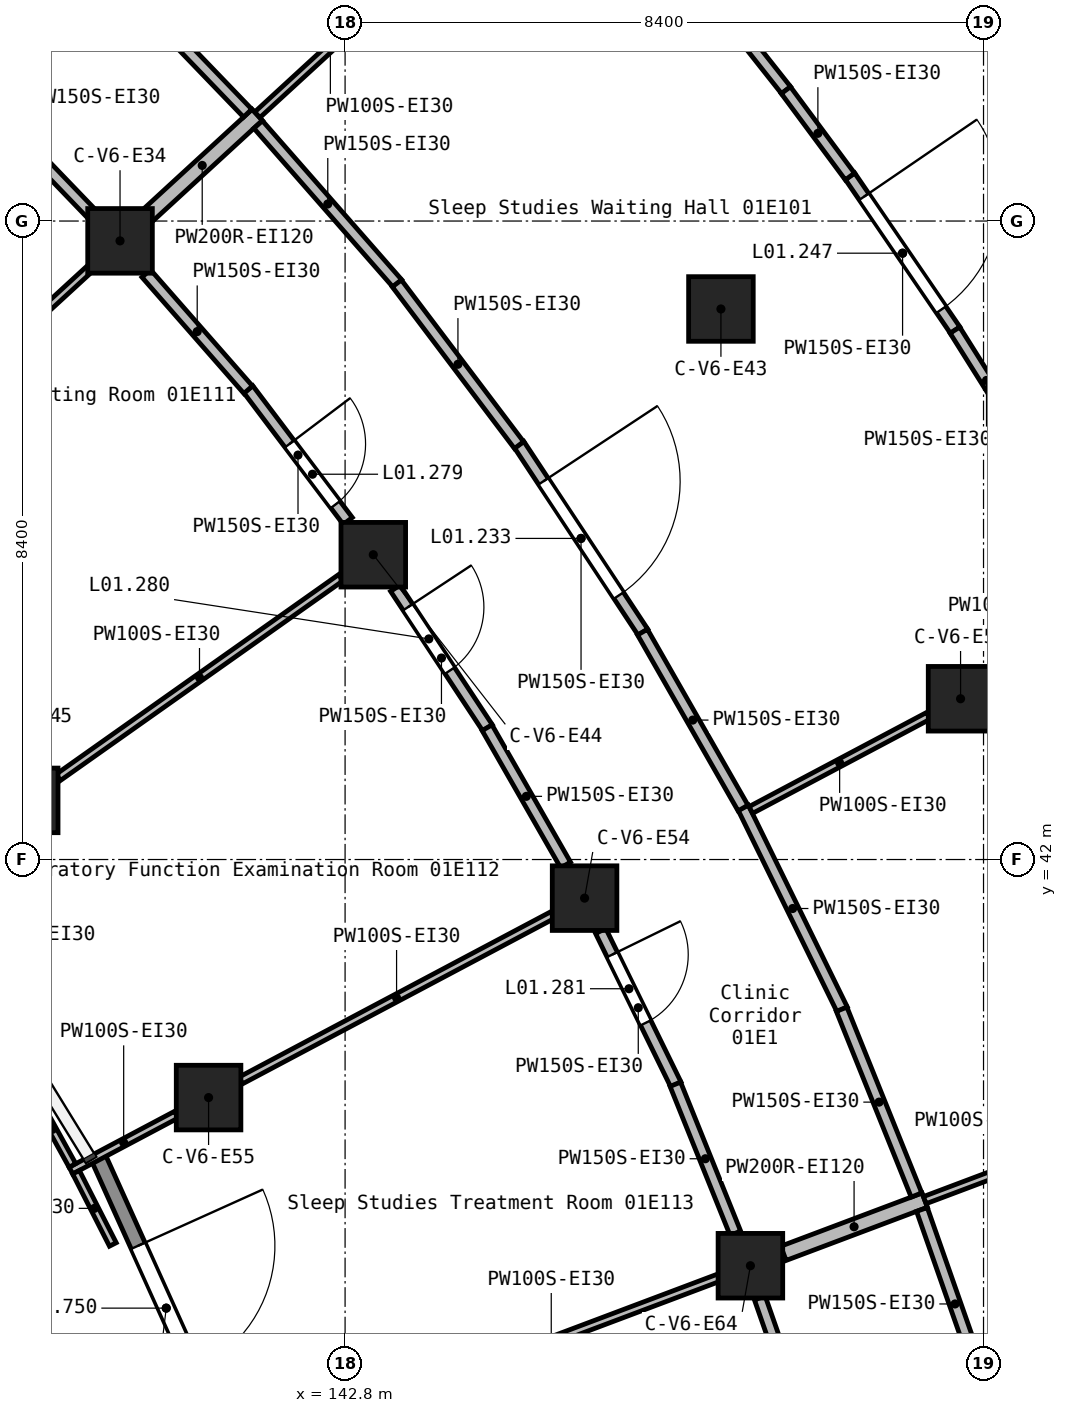
"""IFC4 building model, lengths in metres.
Left out: names, types, materials, properties, quantities, classifications, styles, units other than length and angle.
Written with IfcOpenShell. Run it as: python <this file> out.ifc"""

import sys

from ifc_helpers import new_model, si_unit, direction, frame, frame_2d, origin, origin_2d, place, context, subcontext, project, spatial, rectangle, extrude, element, fill, save


model = new_model("IFC4")
c1 = context("Model", 3, precision=1e-05, world=origin(), true_north=direction((0.0, 1.0)))
c2 = subcontext(c1, "Body", "Model", "MODEL_VIEW")
j1 = project(units=[si_unit("LENGTHUNIT", "METRE"), si_unit("PLANEANGLEUNIT", "RADIAN")], contexts=[c1])
p1 = place(None, origin())
s1 = spatial("IfcSite", under=j1, at=p1, CompositionType="ELEMENT")
p2 = place(p1, origin())
s2 = spatial("IfcBuilding", under=s1, at=p2, CompositionType="ELEMENT")
p3 = place(p2, frame((0.0, 0.0, 5.4)))
s3 = spatial("IfcBuildingStorey", under=s2, at=p3, CompositionType="ELEMENT", Elevation=5.4)
for number, where, z_axis, x_axis in (
    (1, (138.598, 42.778, 0.0), (0.0, 0.0, 1.0), (1.0, 0.0, 0.0)),
    (2, (139.839, 50.139, 0.0), (0.0, 0.0, 1.0), (1.0, 0.0, 0.0)),
    (3, (141.004, 38.868, 0.0), (0.0, 0.0, 1.0), (1.0, 0.0, 0.0)),
    (4, (143.171, 46.01, 0.0), (0.0, 0.0, 1.0), (1.0, 0.0, 0.0)),
    (5, (145.951, 41.492, 0.0), (0.0, 0.0, 1.0), (1.0, 0.0, 0.0)),
    (6, (147.745, 49.243, 0.0), (0.0, 0.0, 1.0), (1.0, 0.0, 0.0)),
    (7, (148.133, 36.656, 0.0), (0.0, 0.0, 1.0), (1.0, 0.0, 0.0)),
    (8, (150.898, 44.115, 0.0), (0.0, 0.0, 1.0), (1.0, 0.0, 0.0)),
):
    element("IfcColumn", number, at=place(p3, frame(where, z_axis=z_axis, x_axis=x_axis)), inside=s3, PredefinedType="COLUMN", context=c2, shape_type="SweptSolid", body=[
        extrude(rectangle(XDim=0.85, YDim=0.85, at=origin_2d()), origin(), (0.0, 0.0, 1.0), 4.5),
    ])
p4 = place(p3, frame((139.549, 38.089, 0.0), z_axis=(0.0, 0.0, 1.0), x_axis=(0.411110484999, -0.911585524854, 0.0)))
e9 = element("IfcWall", 9, at=p4, inside=s3, PredefinedType="STANDARD", context=c2, shape_type="SweptSolid", body=[
    extrude(rectangle(XDim=4.368, YDim=0.2, at=frame_2d((2.184, 0.0))), origin(), (0.0, 0.0, 1.0), 3.35),
])
p5 = place(p4, frame((1.284, 0.0, 0.0)))
e10 = element("IfcOpeningElement", 10, at=p5, cuts=e9, PredefinedType="OPENING", context=c2, shape_type="SweptSolid", body=[
    extrude(rectangle(XDim=1.8, YDim=2.4, at=frame_2d((0.9, 1.2))), frame((0.0, 0.11, 0.0), z_axis=(0.0, -1.0, 0.0), x_axis=(1.0, 0.0, 0.0)), (0.0, 0.0, 1.0), 0.22),
])
p6 = place(p3, frame((140.196, 50.467, 0.0), z_axis=(0.0, 0.0, 1.0), x_axis=(0.736519787736, 0.676415997943, 0.0)))
e11 = element("IfcWall", 11, at=p6, inside=s3, PredefinedType="SOLIDWALL", context=c2, shape_type="SweptSolid", body=[
    extrude(rectangle(XDim=1.966, YDim=0.2, at=frame_2d((0.983, 0.0))), origin(), (0.0, 0.0, 1.0), 4.15),
])
p7 = place(p3, frame((148.567, 36.819, 0.0), z_axis=(0.0, 0.0, 1.0), x_axis=(0.935934561344, 0.352173958268, 0.0)))
e12 = element("IfcWall", 12, at=p7, inside=s3, PredefinedType="SOLIDWALL", context=c2, shape_type="SweptSolid", body=[
    extrude(rectangle(XDim=1.986, YDim=0.2, at=frame_2d((0.993, 0.0))), origin(), (0.0, 0.0, 1.0), 4.15),
])
p8 = place(p3, frame((148.038, 42.683, 0.0), z_axis=(0.0, 0.0, 1.0), x_axis=(0.440200278942, -0.897899612663, 0.0)))
e13 = element("IfcWall", 13, at=p8, inside=s3, PredefinedType="PARTITIONING", context=c2, shape_type="SweptSolid", body=[
    extrude(rectangle(XDim=2.958, YDim=0.15, at=frame_2d((1.479, 0.0))), origin(), (0.0, 0.0, 1.0), 4.15),
])
p9 = place(p3, frame((145.09, 47.458, 0.0), z_axis=(0.0, 0.0, 1.0), x_axis=(0.551018151494, -0.834493257447, 0.0)))
e14 = element("IfcWall", 14, at=p9, inside=s3, PredefinedType="PARTITIONING", context=c2, shape_type="SweptSolid", body=[
    extrude(rectangle(XDim=2.958, YDim=0.15, at=frame_2d((1.479, 0.0))), origin(), (0.0, 0.0, 1.0), 4.15),
])
p10 = place(p9, frame((0.579, 0.0, 0.0)))
e15 = element("IfcOpeningElement", 15, at=p10, cuts=e14, PredefinedType="OPENING", context=c2, shape_type="SweptSolid", body=[
    extrude(rectangle(XDim=1.8, YDim=2.1, at=frame_2d((0.9, 1.05))), frame((0.0, 0.085, 0.0), z_axis=(0.0, -1.0, 0.0), x_axis=(1.0, 0.0, 0.0)), (0.0, 0.0, 1.0), 0.17),
])
p11 = place(p3, frame((146.713, 44.992, 0.0), z_axis=(0.0, 0.0, 1.0), x_axis=(0.49622768999, -0.868192420888, 0.0)))
e16 = element("IfcWall", 16, at=p11, inside=s3, PredefinedType="PARTITIONING", context=c2, shape_type="SweptSolid", body=[
    extrude(rectangle(XDim=2.666, YDim=0.15, at=frame_2d((1.333, 0.0))), origin(), (0.0, 0.0, 1.0), 4.15),
])
p12 = place(p3, frame((141.656, 51.669, 0.0), z_axis=(0.0, 0.0, 1.0), x_axis=(0.659076402407, -0.752075990702, 0.0)))
e17 = element("IfcWall", 17, at=p12, inside=s3, PredefinedType="PARTITIONING", context=c2, shape_type="SweptSolid", body=[
    extrude(rectangle(XDim=2.78, YDim=0.15, at=frame_2d((1.39, 0.0))), origin(), (0.0, 0.0, 1.0), 4.15),
])
p13 = place(p3, frame((149.333, 40.03, 0.0), z_axis=(0.0, 0.0, 1.0), x_axis=(0.373865497673, -0.927482932269, 0.0)))
e18 = element("IfcWall", 18, at=p13, inside=s3, PredefinedType="PARTITIONING", context=c2, shape_type="SweptSolid", body=[
    extrude(rectangle(XDim=2.635, YDim=0.15, at=frame_2d((1.317, 0.0))), origin(), (0.0, 0.0, 1.0), 4.15),
])
p14 = place(p3, frame((143.481, 49.579, 0.0), z_axis=(0.0, 0.0, 1.0), x_axis=(0.602824021104, -0.797874175281, 0.0)))
e19 = element("IfcWall", 19, at=p14, inside=s3, PredefinedType="PARTITIONING", context=c2, shape_type="SweptSolid", body=[
    extrude(rectangle(XDim=2.666, YDim=0.15, at=frame_2d((1.333, 0.0))), origin(), (0.0, 0.0, 1.0), 4.15),
])
p15 = place(p3, frame((139.691, 53.718, 0.0), z_axis=(0.0, 0.0, 1.0), x_axis=(0.693447550136, -0.720507109757, 0.0)))
e20 = element("IfcWall", 20, at=p15, inside=s3, PredefinedType="PARTITIONING", context=c2, shape_type="SweptSolid", body=[
    extrude(rectangle(XDim=2.635, YDim=0.15, at=frame_2d((1.317, 0.0))), origin(), (0.0, 0.0, 1.0), 4.15),
])
p16 = place(p3, frame((150.39, 37.396, 0.0), z_axis=(0.0, 0.0, 1.0), x_axis=(0.330759074405, -0.943715229663, 0.0)))
e21 = element("IfcWall", 21, at=p16, inside=s3, PredefinedType="PARTITIONING", context=c2, shape_type="SweptSolid", body=[
    extrude(rectangle(XDim=2.634, YDim=0.15, at=frame_2d((1.317, 0.0))), origin(), (0.0, 0.0, 1.0), 4.15),
])
p17 = place(p3, frame((146.163, 41.06, 0.0), z_axis=(0.0, 0.0, 1.0), x_axis=(0.439946079235, -0.898024190858, 0.0)))
e22 = element("IfcWall", 22, at=p17, inside=s3, PredefinedType="PARTITIONING", context=c2, shape_type="SweptSolid", body=[
    extrude(rectangle(XDim=2.249, YDim=0.15, at=frame_2d((1.124, 0.0))), origin(), (0.0, 0.0, 1.0), 4.15),
])
p18 = place(p17, frame((0.346, 0.0, 0.0)))
e23 = element("IfcOpeningElement", 23, at=p18, cuts=e22, PredefinedType="OPENING", context=c2, shape_type="SweptSolid", body=[
    extrude(rectangle(XDim=1.0, YDim=2.1, at=frame_2d((0.5, 1.05))), frame((0.0, 0.085, 0.0), z_axis=(0.0, -1.0, 0.0), x_axis=(1.0, 0.0, 0.0)), (0.0, 0.0, 1.0), 0.17),
])
p19 = place(p3, frame((141.526, 48.188, 0.0), z_axis=(0.0, 0.0, 1.0), x_axis=(0.60280129331, -0.797891346477, 0.0)))
e24 = element("IfcWall", 24, at=p19, inside=s3, PredefinedType="PARTITIONING", context=c2, shape_type="SweptSolid", body=[
    extrude(rectangle(XDim=2.172, YDim=0.15, at=frame_2d((1.086, 0.0))), origin(), (0.0, 0.0, 1.0), 4.15),
])
p20 = place(p19, frame((0.902, 0.0, 0.0)))
e25 = element("IfcOpeningElement", 25, at=p20, cuts=e24, PredefinedType="OPENING", context=c2, shape_type="SweptSolid", body=[
    extrude(rectangle(XDim=1.0, YDim=2.1, at=frame_2d((0.5, 1.05))), frame((0.0, 0.085, 0.0), z_axis=(0.0, -1.0, 0.0), x_axis=(1.0, 0.0, 0.0)), (0.0, 0.0, 1.0), 0.17),
])
p21 = place(p3, frame((143.462, 45.57, 0.0), z_axis=(0.0, 0.0, 1.0), x_axis=(0.550880835548, -0.834583911315, 0.0)))
e26 = element("IfcWall", 26, at=p21, inside=s3, PredefinedType="PARTITIONING", context=c2, shape_type="SweptSolid", body=[
    extrude(rectangle(XDim=2.201, YDim=0.15, at=frame_2d((1.101, 0.0))), origin(), (0.0, 0.0, 1.0), 4.15),
])
p22 = place(p21, frame((0.299, 0.0, 0.0)))
e27 = element("IfcOpeningElement", 27, at=p22, cuts=e26, PredefinedType="OPENING", context=c2, shape_type="SweptSolid", body=[
    extrude(rectangle(XDim=1.0, YDim=2.1, at=frame_2d((0.5, 1.05))), frame((0.0, 0.085, 0.0), z_axis=(0.0, -1.0, 0.0), x_axis=(1.0, 0.0, 0.0)), (0.0, 0.0, 1.0), 0.17),
])
p23 = place(p3, frame((144.668, 43.734, 0.0), z_axis=(0.0, 0.0, 1.0), x_axis=(0.496694973164, -0.867925171679, 0.0)))
e28 = element("IfcWall", 28, at=p23, inside=s3, PredefinedType="PARTITIONING", context=c2, shape_type="SweptSolid", body=[
    extrude(rectangle(XDim=2.08, YDim=0.15, at=frame_2d((1.04, 0.0))), origin(), (0.0, 0.0, 1.0), 4.15),
])
p24 = place(p3, frame((147.145, 39.043, 0.0), z_axis=(0.0, 0.0, 1.0), x_axis=(0.373899406404, -0.927469263043, 0.0)))
e29 = element("IfcWall", 29, at=p24, inside=s3, PredefinedType="PARTITIONING", context=c2, shape_type="SweptSolid", body=[
    extrude(rectangle(XDim=2.113, YDim=0.15, at=frame_2d((1.057, 0.0))), origin(), (0.0, 0.0, 1.0), 4.15),
])
p25 = place(p3, frame((148.257, 36.232, 0.0), z_axis=(0.0, 0.0, 1.0), x_axis=(0.330477279651, -0.943813947574, 0.0)))
e30 = element("IfcWall", 30, at=p25, inside=s3, PredefinedType="PARTITIONING", context=c2, shape_type="SweptSolid", body=[
    extrude(rectangle(XDim=2.143, YDim=0.15, at=frame_2d((1.072, 0.0))), origin(), (0.0, 0.0, 1.0), 4.15),
])
p26 = place(p3, frame((140.184, 49.71, 0.0), z_axis=(0.0, 0.0, 1.0), x_axis=(0.659209376091, -0.751959439381, 0.0)))
e31 = element("IfcWall", 31, at=p26, inside=s3, PredefinedType="PARTITIONING", context=c2, shape_type="SweptSolid", body=[
    extrude(rectangle(XDim=2.035, YDim=0.15, at=frame_2d((1.017, 0.0))), origin(), (0.0, 0.0, 1.0), 4.15),
])
p27 = place(p3, frame((138.031, 51.985, 0.0), z_axis=(0.0, 0.0, 1.0), x_axis=(0.693216793474, -0.7207291289, 0.0)))
e32 = element("IfcWall", 32, at=p27, inside=s3, PredefinedType="PARTITIONING", context=c2, shape_type="SweptSolid", body=[
    extrude(rectangle(XDim=2.076, YDim=0.15, at=frame_2d((1.038, 0.0))), origin(), (0.0, 0.0, 1.0), 4.15),
])
p28 = place(p3, frame((149.443, 50.99, 0.0), z_axis=(0.0, 0.0, 1.0), x_axis=(0.564305795339, -0.825565847977, 0.0)))
e33 = element("IfcWall", 33, at=p28, inside=s3, PredefinedType="PARTITIONING", context=c2, shape_type="SweptSolid", body=[
    extrude(rectangle(XDim=2.454, YDim=0.15, at=frame_2d((1.227, 0.0))), origin(), (0.0, 0.0, 1.0), 4.15),
])
p29 = place(p28, frame((0.327, 0.0, 0.0)))
e34 = element("IfcOpeningElement", 34, at=p29, cuts=e33, PredefinedType="OPENING", context=c2, shape_type="SweptSolid", body=[
    extrude(rectangle(XDim=1.8, YDim=2.1, at=frame_2d((0.9, 1.05))), frame((0.0, 0.085, 0.0), z_axis=(0.0, -1.0, 0.0), x_axis=(1.0, 0.0, 0.0)), (0.0, 0.0, 1.0), 0.17),
])
p30 = place(p3, frame((150.823, 48.965, 0.0), z_axis=(0.0, 0.0, 1.0), x_axis=(0.531963557529, -0.846767248694, 0.0)))
e35 = element("IfcWall", 35, at=p30, inside=s3, PredefinedType="PARTITIONING", context=c2, shape_type="SweptSolid", body=[
    extrude(rectangle(XDim=1.563, YDim=0.15, at=frame_2d((0.781, 0.0))), origin(), (0.0, 0.0, 1.0), 4.15),
])
p31 = place(p3, frame((147.542, 53.462, 0.0), z_axis=(0.0, 0.0, 1.0), x_axis=(0.620542012859, -0.784173201708, 0.0)))
e36 = element("IfcWall", 36, at=p31, inside=s3, PredefinedType="PARTITIONING", context=c2, shape_type="SweptSolid", body=[
    extrude(rectangle(XDim=1.71, YDim=0.15, at=frame_2d((0.855, 0.0))), origin(), (0.0, 0.0, 1.0), 4.15),
])
p32 = place(p3, frame((148.599, 52.122, 0.0), z_axis=(0.0, 0.0, 1.0), x_axis=(0.595875663086, -0.803076705017, 0.0)))
e37 = element("IfcWall", 37, at=p32, inside=s3, PredefinedType="PARTITIONING", context=c2, shape_type="SweptSolid", body=[
    extrude(rectangle(XDim=1.414, YDim=0.15, at=frame_2d((0.707, 0.0))), origin(), (0.0, 0.0, 1.0), 4.15),
])
p33 = place(p3, frame((139.193, 37.908, 0.0), z_axis=(0.0, 0.0, 1.0), x_axis=(0.883481589726, 0.468465879884, 0.0)))
e38 = element("IfcWall", 38, at=p33, inside=s3, PredefinedType="PARTITIONING", context=c2, shape_type="SweptSolid", body=[
    extrude(rectangle(XDim=1.571, YDim=0.1, at=frame_2d((0.786, 0.0))), origin(), (0.0, 0.0, 1.0), 4.15),
])
p34 = place(p3, frame((141.427, 39.093, 0.0), z_axis=(0.0, 0.0, 1.0), x_axis=(0.88344099274, 0.46854243388, 0.0)))
e39 = element("IfcWall", 39, at=p34, inside=s3, PredefinedType="PARTITIONING", context=c2, shape_type="SweptSolid", body=[
    extrude(rectangle(XDim=4.642, YDim=0.1, at=frame_2d((2.321, 0.0))), origin(), (0.0, 0.0, 1.0), 4.15),
])
p35 = place(p3, frame((139.026, 43.081, 0.0), z_axis=(0.0, 0.0, 1.0), x_axis=(0.816637661001, 0.577150700108, 0.0)))
e40 = element("IfcWall", 40, at=p35, inside=s3, PredefinedType="PARTITIONING", context=c2, shape_type="SweptSolid", body=[
    extrude(rectangle(XDim=4.551, YDim=0.1, at=frame_2d((2.275, 0.0))), origin(), (0.0, 0.0, 1.0), 4.15),
])
p36 = place(p3, frame((143.309, 34.84, 0.0), z_axis=(0.0, 0.0, 1.0), x_axis=(0.935891610639, 0.352288082591, 0.0)))
e41 = element("IfcWall", 41, at=p36, inside=s3, PredefinedType="PARTITIONING", context=c2, shape_type="SweptSolid", body=[
    extrude(rectangle(XDim=4.708, YDim=0.1, at=frame_2d((2.354, 0.0))), origin(), (0.0, 0.0, 1.0), 4.15),
])
p37 = place(p3, frame((136.111, 46.715, 0.0), z_axis=(0.0, 0.0, 1.0), x_axis=(0.736475017651, 0.676464742892, 0.0)))
e42 = element("IfcWall", 42, at=p37, inside=s3, PredefinedType="PARTITIONING", context=c2, shape_type="SweptSolid", body=[
    extrude(rectangle(XDim=4.524, YDim=0.1, at=frame_2d((2.262, 0.0))), origin(), (0.0, 0.0, 1.0), 4.15),
])
p38 = place(p3, frame((150.427, 37.519, 0.0), z_axis=(0.0, 0.0, 1.0), x_axis=(0.935894141782, 0.352281358262, 0.0)))
e43 = element("IfcWall", 43, at=p38, inside=s3, PredefinedType="PARTITIONING", context=c2, shape_type="SweptSolid", body=[
    extrude(rectangle(XDim=2.703, YDim=0.1, at=frame_2d((1.352, 0.0))), origin(), (0.0, 0.0, 1.0), 4.15),
])
p39 = place(p3, frame((141.645, 51.798, 0.0), z_axis=(0.0, 0.0, 1.0), x_axis=(0.73658314114, 0.676347008709, 0.0)))
e44 = element("IfcWall", 44, at=p39, inside=s3, PredefinedType="PARTITIONING", context=c2, shape_type="SweptSolid", body=[
    extrude(rectangle(XDim=2.61, YDim=0.1, at=frame_2d((1.305, 0.0))), origin(), (0.0, 0.0, 1.0), 4.15),
])
p40 = place(p3, frame((148.139, 42.652, 0.0), z_axis=(0.0, 0.0, 1.0), x_axis=(0.883500310686, 0.468430572249, 0.0)))
e45 = element("IfcWall", 45, at=p40, inside=s3, PredefinedType="PARTITIONING", context=c2, shape_type="SweptSolid", body=[
    extrude(rectangle(XDim=2.645, YDim=0.1, at=frame_2d((1.322, 0.0))), origin(), (0.0, 0.0, 1.0), 4.15),
])
p41 = place(p3, frame((139.26, 37.886, 0.0), z_axis=(0.0, 0.0, 1.0), x_axis=(0.454251585092, -0.890873446367, 0.0)))
e46 = element("IfcWall", 46, at=p41, inside=s3, PredefinedType="PARTITIONING", context=c2, shape_type="SweptSolid", body=[
    extrude(rectangle(XDim=1.066, YDim=0.1, at=frame_2d((0.533, 0.0))), origin(), (0.0, 0.0, 1.0), 4.15),
])
p42 = place(p3, frame((138.689, 38.925, 0.0), z_axis=(0.0, 0.0, 1.0), x_axis=(0.482886802116, -0.875682782942, 0.0)))
e47 = element("IfcWall", 47, at=p42, inside=s3, PredefinedType="PARTITIONING", context=c2, shape_type="SweptSolid", body=[
    extrude(rectangle(XDim=1.084, YDim=0.1, at=frame_2d((0.542, 0.0))), origin(), (0.0, 0.0, 1.0), 4.15),
])
p43 = place(p5, origin())
e48 = element("IfcDoor", 48, at=p43, inside=s3, OperationType="SINGLE_SWING_LEFT", PredefinedType="DOOR", context=c2, shape_type="SweptSolid", body=[
    extrude(rectangle(XDim=1.8, YDim=2.4, at=frame_2d((0.9, 1.2))), frame((0.0, 0.025, 0.0), z_axis=(0.0, -1.0, 0.0), x_axis=(1.0, 0.0, 0.0)), (0.0, 0.0, 1.0), 0.05),
])
fill(e10, e48)
p44 = place(p10, frame((1.8, 0.0, 0.0), z_axis=(0.0, 0.0, 1.0), x_axis=(-1.0, 0.0, 0.0)))
e49 = element("IfcDoor", 49, at=p44, inside=s3, OperationType="DOUBLE_DOOR_SINGLE_SWING", PredefinedType="DOOR", context=c2, shape_type="SweptSolid", body=[
    extrude(rectangle(XDim=1.8, YDim=2.1, at=frame_2d((0.9, 1.05))), frame((0.0, 0.025, 0.0), z_axis=(0.0, -1.0, 0.0), x_axis=(1.0, 0.0, 0.0)), (0.0, 0.0, 1.0), 0.05),
])
fill(e15, e49)
p45 = place(p29, origin())
e50 = element("IfcDoor", 50, at=p45, inside=s3, OperationType="DOUBLE_DOOR_SINGLE_SWING", PredefinedType="DOOR", context=c2, shape_type="SweptSolid", body=[
    extrude(rectangle(XDim=1.8, YDim=2.1, at=frame_2d((0.9, 1.05))), frame((0.0, 0.025, 0.0), z_axis=(0.0, -1.0, 0.0), x_axis=(1.0, 0.0, 0.0)), (0.0, 0.0, 1.0), 0.05),
])
fill(e34, e50)
p46 = place(p20, frame((1.0, 0.0, 0.0), z_axis=(0.0, 0.0, 1.0), x_axis=(-1.0, 0.0, 0.0)))
e51 = element("IfcDoor", 51, at=p46, inside=s3, OperationType="SINGLE_SWING_LEFT", PredefinedType="DOOR", context=c2, shape_type="SweptSolid", body=[
    extrude(rectangle(XDim=1.0, YDim=2.1, at=frame_2d((0.5, 1.05))), frame((0.0, 0.025, 0.0), z_axis=(0.0, -1.0, 0.0), x_axis=(1.0, 0.0, 0.0)), (0.0, 0.0, 1.0), 0.05),
])
fill(e25, e51)
p47 = place(p22, frame((1.0, 0.0, 0.0), z_axis=(0.0, 0.0, 1.0), x_axis=(-1.0, 0.0, 0.0)))
e52 = element("IfcDoor", 52, at=p47, inside=s3, OperationType="SINGLE_SWING_RIGHT", PredefinedType="DOOR", context=c2, shape_type="SweptSolid", body=[
    extrude(rectangle(XDim=1.0, YDim=2.1, at=frame_2d((0.5, 1.05))), frame((0.0, 0.025, 0.0), z_axis=(0.0, -1.0, 0.0), x_axis=(1.0, 0.0, 0.0)), (0.0, 0.0, 1.0), 0.05),
])
fill(e27, e52)
p48 = place(p18, frame((1.0, 0.0, 0.0), z_axis=(0.0, 0.0, 1.0), x_axis=(-1.0, 0.0, 0.0)))
e53 = element("IfcDoor", 53, at=p48, inside=s3, OperationType="SINGLE_SWING_RIGHT", PredefinedType="DOOR", context=c2, shape_type="SweptSolid", body=[
    extrude(rectangle(XDim=1.0, YDim=2.1, at=frame_2d((0.5, 1.05))), frame((0.0, 0.025, 0.0), z_axis=(0.0, -1.0, 0.0), x_axis=(1.0, 0.0, 0.0)), (0.0, 0.0, 1.0), 0.05),
])
fill(e23, e53)
save(model, sys.argv[1])
